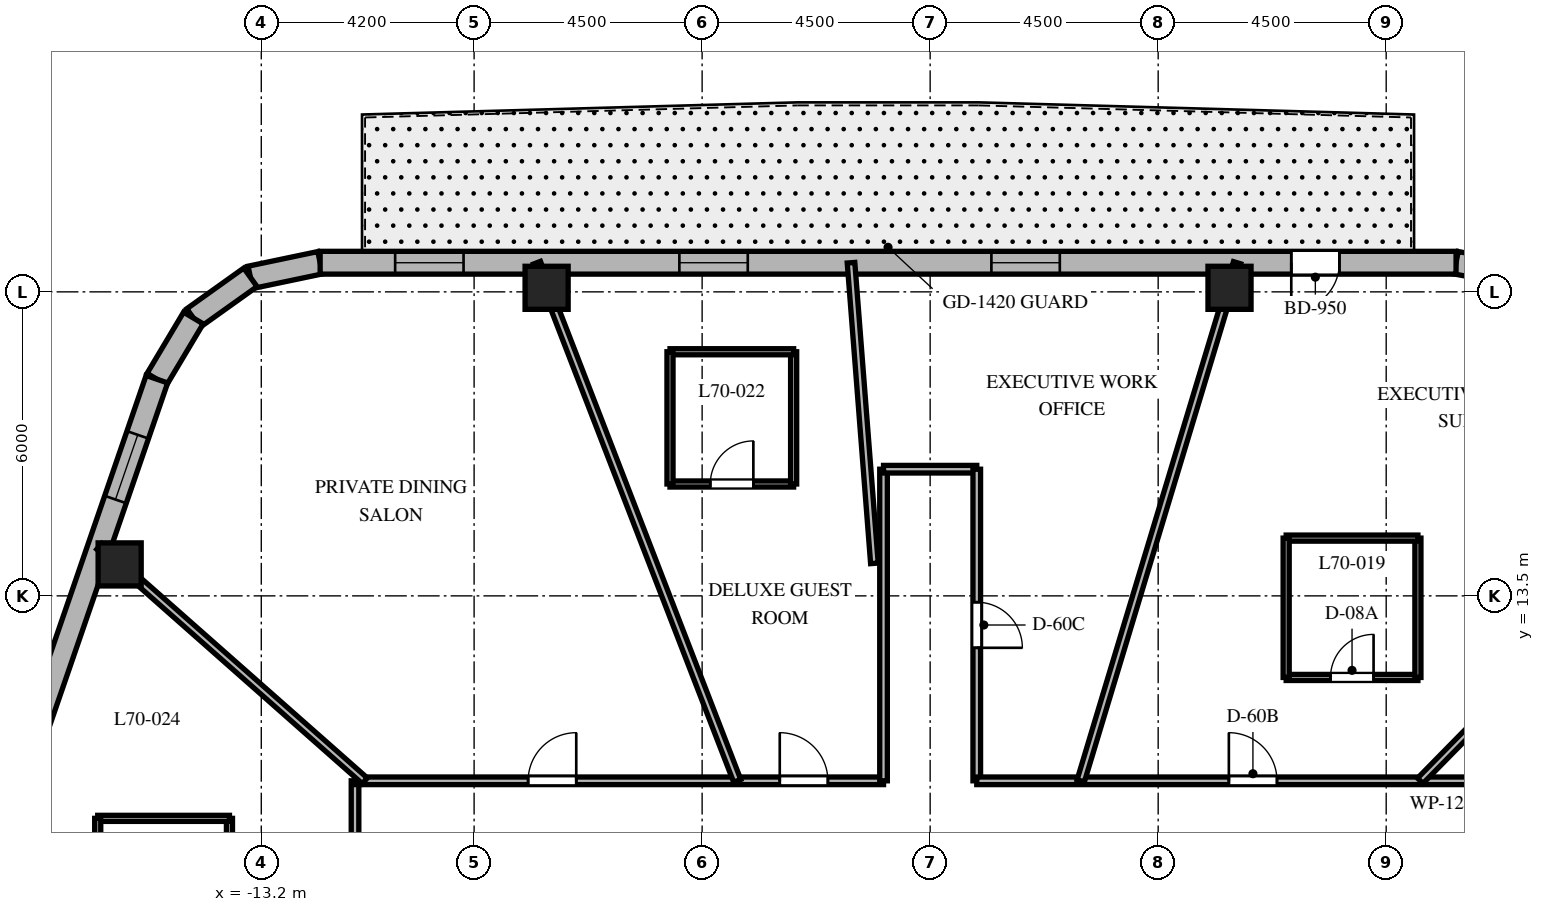
"""IFC4 building model, lengths in metres.
Left out: names, types, materials, properties, quantities, classifications, styles, units other than length and angle.
Written with IfcOpenShell. Run it as: python <this file> out.ifc"""

import sys

from ifc_helpers import new_model, si_unit, direction, frame, frame_2d, origin, origin_2d, place, context, subcontext, project, spatial, rectangle, extrude, element, fill, save


model = new_model("IFC4")
c1 = context("Model", 3, precision=1e-05, world=origin(), true_north=direction((0.0, 1.0)))
c2 = subcontext(c1, "Body", "Model", "MODEL_VIEW")
j1 = project(units=[si_unit("LENGTHUNIT", "METRE"), si_unit("PLANEANGLEUNIT", "RADIAN")], contexts=[c1])
p1 = place(None, origin())
s1 = spatial("IfcSite", under=j1, at=p1, CompositionType="ELEMENT")
p2 = place(p1, origin())
s2 = spatial("IfcBuilding", under=s1, at=p2, CompositionType="ELEMENT")
p3 = place(p2, frame((0.0, 0.0, 280.8)))
s3 = spatial("IfcBuildingStorey", under=s2, at=p3, CompositionType="ELEMENT", Elevation=280.8)
for number, where, z_axis, x_axis in (
    (1, (5.908, 19.58, 0.0), (0.0, 0.0, 1.0), (1.0, 0.0, 0.0)),
    (2, (-7.569, 19.58, 0.0), (0.0, 0.0, 1.0), (1.0, 0.0, 0.0)),
    (3, (-15.995, 14.121, 0.0), (0.0, 0.0, 1.0), (1.0, 0.0, 0.0)),
):
    element("IfcColumn", number, at=place(p3, frame(where, z_axis=z_axis, x_axis=x_axis)), inside=s3, PredefinedType="COLUMN", context=c2, shape_type="SweptSolid", body=[
        extrude(rectangle(XDim=0.85, YDim=0.85, at=origin_2d()), origin(), (0.0, 0.0, 1.0), 3.9),
    ])
p4 = place(p3, frame((11.626, 19.84, 0.0), z_axis=(0.0, 0.0, 1.0), x_axis=(-0.982701956681, 0.185194126083, 0.0)))
e4 = element("IfcWall", 4, at=p4, inside=s3, PredefinedType="SOLIDWALL", context=c2, shape_type="SweptSolid", body=[
    extrude(rectangle(XDim=1.27, YDim=0.45, at=frame_2d((0.635, 0.0))), origin(), (0.0, 0.0, 1.0), 3.6),
])
p5 = place(p3, frame((-12.038, 20.075, 0.0), z_axis=(0.0, 0.0, 1.0), x_axis=(-0.978750122553, -0.205056571711, 0.0)))
e5 = element("IfcWall", 5, at=p5, inside=s3, PredefinedType="SOLIDWALL", context=c2, shape_type="SweptSolid", body=[
    extrude(rectangle(XDim=1.406, YDim=0.45, at=frame_2d((0.703, 0.0))), origin(), (0.0, 0.0, 1.0), 3.6),
])
p6 = place(p3, frame((-13.415, 19.787, 0.0), z_axis=(0.0, 0.0, 1.0), x_axis=(-0.814055493997, -0.580787097561, 0.0)))
e6 = element("IfcWall", 6, at=p6, inside=s3, PredefinedType="SOLIDWALL", context=c2, shape_type="SweptSolid", body=[
    extrude(rectangle(XDim=1.383, YDim=0.45, at=frame_2d((0.691, 0.0))), origin(), (0.0, 0.0, 1.0), 3.6),
])
p7 = place(p3, frame((-14.54, 18.984, 0.0), z_axis=(0.0, 0.0, 1.0), x_axis=(-0.512374906623, -0.858761873317, 0.0)))
e7 = element("IfcWall", 7, at=p7, inside=s3, PredefinedType="SOLIDWALL", context=c2, shape_type="SweptSolid", body=[
    extrude(rectangle(XDim=1.406, YDim=0.45, at=frame_2d((0.703, 0.0))), origin(), (0.0, 0.0, 1.0), 3.6),
])
p8 = place(p3, frame((10.379, 20.075, 0.0), z_axis=(0.0, 0.0, 1.0), x_axis=(-1.0, 0.0, 0.0)))
e8 = element("IfcWall", 8, at=p8, inside=s3, PredefinedType="SOLIDWALL", context=c2, shape_type="SweptSolid", body=[
    extrude(rectangle(XDim=22.417, YDim=0.45, at=frame_2d((11.208, 0.0))), origin(), (0.0, 0.0, 1.0), 3.6),
])
p9 = place(p8, frame((2.302, 0.0, 0.0)))
e9 = element("IfcOpeningElement", 9, at=p9, cuts=e8, PredefinedType="OPENING", context=c2, shape_type="SweptSolid", body=[
    extrude(rectangle(XDim=0.95, YDim=2.15, at=frame_2d((0.475, 1.075))), frame((0.0, 0.235, 0.0), z_axis=(0.0, -1.0, 0.0), x_axis=(1.0, 0.0, 0.0)), (0.0, 0.0, 1.0), 0.47),
])
p10 = place(p8, frame((7.82, 0.0, 0.8)))
e10 = element("IfcOpeningElement", 10, at=p10, cuts=e8, PredefinedType="OPENING", context=c2, shape_type="SweptSolid", body=[
    extrude(rectangle(XDim=1.35, YDim=1.75, at=frame_2d((0.675, 0.875))), frame((0.0, 0.235, 0.0), z_axis=(0.0, -1.0, 0.0), x_axis=(1.0, 0.0, 0.0)), (0.0, 0.0, 1.0), 0.47),
])
p11 = place(p8, frame((13.978, 0.0, 0.8)))
e11 = element("IfcOpeningElement", 11, at=p11, cuts=e8, PredefinedType="OPENING", context=c2, shape_type="SweptSolid", body=[
    extrude(rectangle(XDim=1.35, YDim=1.75, at=frame_2d((0.675, 0.875))), frame((0.0, 0.235, 0.0), z_axis=(0.0, -1.0, 0.0), x_axis=(1.0, 0.0, 0.0)), (0.0, 0.0, 1.0), 0.47),
])
p12 = place(p8, frame((19.587, 0.0, 0.8)))
e12 = element("IfcOpeningElement", 12, at=p12, cuts=e8, PredefinedType="OPENING", context=c2, shape_type="SweptSolid", body=[
    extrude(rectangle(XDim=1.35, YDim=1.75, at=frame_2d((0.675, 0.875))), frame((0.0, 0.235, 0.0), z_axis=(0.0, -1.0, 0.0), x_axis=(1.0, 0.0, 0.0)), (0.0, 0.0, 1.0), 0.47),
])
p13 = place(p3, frame((-15.26, 17.776, 0.0), z_axis=(0.0, 0.0, 1.0), x_axis=(-0.325407437101, -0.945573899745, 0.0)))
e13 = element("IfcWall", 13, at=p13, inside=s3, PredefinedType="SOLIDWALL", context=c2, shape_type="SweptSolid", body=[
    extrude(rectangle(XDim=18.552, YDim=0.45, at=frame_2d((9.276, 0.0))), origin(), (0.0, 0.0, 1.0), 3.6),
])
p14 = place(p13, frame((1.161, 0.0, 0.8)))
e14 = element("IfcOpeningElement", 14, at=p14, cuts=e13, PredefinedType="OPENING", context=c2, shape_type="SweptSolid", body=[
    extrude(rectangle(XDim=1.35, YDim=1.75, at=frame_2d((0.675, 0.875))), frame((0.0, 0.235, 0.0), z_axis=(0.0, -1.0, 0.0), x_axis=(1.0, 0.0, 0.0)), (0.0, 0.0, 1.0), 0.47),
])
p15 = place(p13, frame((8.548, 0.0, 0.8)))
e15 = element("IfcOpeningElement", 15, at=p15, cuts=e13, PredefinedType="OPENING", context=c2, shape_type="SweptSolid", body=[
    extrude(rectangle(XDim=1.35, YDim=1.75, at=frame_2d((0.675, 0.875))), frame((0.0, 0.235, 0.0), z_axis=(0.0, -1.0, 0.0), x_axis=(1.0, 0.0, 0.0)), (0.0, 0.0, 1.0), 0.47),
])
p16 = place(p13, frame((15.987, 0.0, 0.8)))
e16 = element("IfcOpeningElement", 16, at=p16, cuts=e13, PredefinedType="OPENING", context=c2, shape_type="SweptSolid", body=[
    extrude(rectangle(XDim=1.35, YDim=1.75, at=frame_2d((0.675, 0.875))), frame((0.0, 0.235, 0.0), z_axis=(0.0, -1.0, 0.0), x_axis=(1.0, 0.0, 0.0)), (0.0, 0.0, 1.0), 0.47),
])
p17 = place(p3, frame((-11.35, 4.4, 0.0), z_axis=(0.0, 0.0, 1.0), x_axis=(0.0, 1.0, 0.0)))
e17 = element("IfcWall", 17, at=p17, inside=s3, PredefinedType="PARTITIONING", context=c2, shape_type="SweptSolid", body=[
    extrude(rectangle(XDim=5.45, YDim=0.15, at=frame_2d((2.725, 0.0))), origin(), (0.0, 0.0, 1.0), 3.09),
])
p18 = place(p3, frame((-11.35, 9.85, 0.0), z_axis=(0.0, 0.0, 1.0), x_axis=(1.0, 0.0, 0.0)))
e18 = element("IfcWall", 18, at=p18, inside=s3, PredefinedType="PARTITIONING", context=c2, shape_type="SweptSolid", body=[
    extrude(rectangle(XDim=10.43, YDim=0.15, at=frame_2d((5.215, 0.0))), origin(), (0.0, 0.0, 1.0), 3.09),
])
p19 = place(p18, frame((8.382, 0.0, 0.0)))
e19 = element("IfcOpeningElement", 19, at=p19, cuts=e18, PredefinedType="OPENING", context=c2, shape_type="SweptSolid", body=[
    extrude(rectangle(XDim=0.95, YDim=2.03, at=frame_2d((0.475, 1.015))), frame((0.0, 0.085, 0.0), z_axis=(0.0, -1.0, 0.0), x_axis=(1.0, 0.0, 0.0)), (0.0, 0.0, 1.0), 0.17),
])
p20 = place(p18, frame((3.416, 0.0, 0.0)))
e20 = element("IfcOpeningElement", 20, at=p20, cuts=e18, PredefinedType="OPENING", context=c2, shape_type="SweptSolid", body=[
    extrude(rectangle(XDim=0.95, YDim=2.03, at=frame_2d((0.475, 1.015))), frame((0.0, 0.085, 0.0), z_axis=(0.0, -1.0, 0.0), x_axis=(1.0, 0.0, 0.0)), (0.0, 0.0, 1.0), 0.17),
])
p21 = place(p3, frame((-0.92, 9.85, 0.0), z_axis=(0.0, 0.0, 1.0), x_axis=(0.0, 1.0, 0.0)))
e21 = element("IfcWall", 21, at=p21, inside=s3, PredefinedType="PARTITIONING", context=c2, shape_type="SweptSolid", body=[
    extrude(rectangle(XDim=6.15, YDim=0.15, at=frame_2d((3.075, 0.0))), origin(), (0.0, 0.0, 1.0), 3.041),
])
p22 = place(p3, frame((-0.92, 16.0, 0.0), z_axis=(0.0, 0.0, 1.0), x_axis=(1.0, 0.0, 0.0)))
e22 = element("IfcWall", 22, at=p22, inside=s3, PredefinedType="PARTITIONING", context=c2, shape_type="SweptSolid", body=[
    extrude(rectangle(XDim=1.84, YDim=0.15, at=frame_2d((0.92, 0.0))), origin(), (0.0, 0.0, 1.0), 3.6),
])
p23 = place(p3, frame((0.92, 16.0, 0.0), z_axis=(0.0, 0.0, 1.0), x_axis=(0.0, -1.0, 0.0)))
e23 = element("IfcWall", 23, at=p23, inside=s3, PredefinedType="PARTITIONING", context=c2, shape_type="SweptSolid", body=[
    extrude(rectangle(XDim=6.15, YDim=0.15, at=frame_2d((3.075, 0.0))), origin(), (0.0, 0.0, 1.0), 3.041),
])
p24 = place(p23, frame((2.625, 0.0, 0.0)))
e24 = element("IfcOpeningElement", 24, at=p24, cuts=e23, PredefinedType="OPENING", context=c2, shape_type="SweptSolid", body=[
    extrude(rectangle(XDim=0.9, YDim=2.03, at=frame_2d((0.45, 1.015))), frame((0.0, 0.085, 0.0), z_axis=(0.0, -1.0, 0.0), x_axis=(1.0, 0.0, 0.0)), (0.0, 0.0, 1.0), 0.17),
])
p25 = place(p3, frame((0.92, 9.85, 0.0), z_axis=(0.0, 0.0, 1.0), x_axis=(1.0, 0.0, 0.0)))
e25 = element("IfcWall", 25, at=p25, inside=s3, PredefinedType="PARTITIONING", context=c2, shape_type="SweptSolid", body=[
    extrude(rectangle(XDim=10.43, YDim=0.15, at=frame_2d((5.215, 0.0))), origin(), (0.0, 0.0, 1.0), 3.09),
])
p26 = place(p25, frame((4.975, 0.0, 0.0)))
e26 = element("IfcOpeningElement", 26, at=p26, cuts=e25, PredefinedType="OPENING", context=c2, shape_type="SweptSolid", body=[
    extrude(rectangle(XDim=0.95, YDim=2.03, at=frame_2d((0.475, 1.015))), frame((0.0, 0.085, 0.0), z_axis=(0.0, -1.0, 0.0), x_axis=(1.0, 0.0, 0.0)), (0.0, 0.0, 1.0), 0.17),
])
p27 = place(p3, frame((9.672, 9.85, 0.0), z_axis=(0.0, 0.0, 1.0), x_axis=(0.700629771301, 0.713524998558, 0.0)))
e27 = element("IfcWall", 27, at=p27, inside=s3, PredefinedType="PARTITIONING", context=c2, shape_type="SweptSolid", body=[
    extrude(rectangle(XDim=7.459, YDim=0.15, at=frame_2d((3.73, 0.0))), origin(), (0.0, 0.0, 1.0), 2.94),
])
p28 = place(p3, frame((2.972, 9.85, 0.0), z_axis=(0.0, 0.0, 1.0), x_axis=(0.288872169679, 0.957367677324, 0.0)))
e28 = element("IfcWall", 28, at=p28, inside=s3, PredefinedType="PARTITIONING", context=c2, shape_type="SweptSolid", body=[
    extrude(rectangle(XDim=10.68, YDim=0.15, at=frame_2d((5.34, 0.0))), origin(), (0.0, 0.0, 1.0), 2.94),
])
p29 = place(p3, frame((-1.1, 14.142, 0.0), z_axis=(0.0, 0.0, 1.0), x_axis=(-0.077534071454, 0.996989702938, 0.0)))
e29 = element("IfcWall", 29, at=p29, inside=s3, PredefinedType="PARTITIONING", context=c2, shape_type="SweptSolid", body=[
    extrude(rectangle(XDim=5.951, YDim=0.15, at=frame_2d((2.976, 0.0))), origin(), (0.0, 0.0, 1.0), 2.94),
])
p30 = place(p3, frame((-3.808, 9.85, 0.0), z_axis=(0.0, 0.0, 1.0), x_axis=(-0.360587327934, 0.932725457427, 0.0)))
e30 = element("IfcWall", 30, at=p30, inside=s3, PredefinedType="PARTITIONING", context=c2, shape_type="SweptSolid", body=[
    extrude(rectangle(XDim=10.962, YDim=0.15, at=frame_2d((5.481, 0.0))), origin(), (0.0, 0.0, 1.0), 2.94),
])
p31 = place(p3, frame((-11.157, 9.85, 0.0), z_axis=(0.0, 0.0, 1.0), x_axis=(-0.74966962095, 0.661812253909, 0.0)))
e31 = element("IfcWall", 31, at=p31, inside=s3, PredefinedType="PARTITIONING", context=c2, shape_type="SweptSolid", body=[
    extrude(rectangle(XDim=6.989, YDim=0.15, at=frame_2d((3.494, 0.0))), origin(), (0.0, 0.0, 1.0), 2.94),
])
p32 = place(p3, frame((7.026, 11.89, 0.0), z_axis=(0.0, 0.0, 1.0), x_axis=(1.0, 0.0, 0.0)))
e32 = element("IfcWall", 32, at=p32, inside=s3, PredefinedType="PARTITIONING", context=c2, shape_type="SweptSolid", body=[
    extrude(rectangle(XDim=2.6, YDim=0.12, at=frame_2d((1.3, 0.0))), origin(), (0.0, 0.0, 1.0), 3.041),
])
p33 = place(p32, frame((0.875, 0.0, 0.0)))
e33 = element("IfcOpeningElement", 33, at=p33, cuts=e32, PredefinedType="OPENING", context=c2, shape_type="SweptSolid", body=[
    extrude(rectangle(XDim=0.85, YDim=2.03, at=frame_2d((0.425, 1.015))), frame((0.0, 0.07, 0.0), z_axis=(0.0, -1.0, 0.0), x_axis=(1.0, 0.0, 0.0)), (0.0, 0.0, 1.0), 0.14),
])
p34 = place(p3, frame((9.626, 11.89, 0.0), z_axis=(0.0, 0.0, 1.0), x_axis=(0.0, 1.0, 0.0)))
e34 = element("IfcWall", 34, at=p34, inside=s3, PredefinedType="PARTITIONING", context=c2, shape_type="SweptSolid", body=[
    extrude(rectangle(XDim=2.75, YDim=0.12, at=frame_2d((1.375, 0.0))), origin(), (0.0, 0.0, 1.0), 3.172),
])
p35 = place(p3, frame((9.626, 14.64, 0.0), z_axis=(0.0, 0.0, 1.0), x_axis=(-1.0, 0.0, 0.0)))
e35 = element("IfcWall", 35, at=p35, inside=s3, PredefinedType="PARTITIONING", context=c2, shape_type="SweptSolid", body=[
    extrude(rectangle(XDim=2.6, YDim=0.12, at=frame_2d((1.3, 0.0))), origin(), (0.0, 0.0, 1.0), 3.172),
])
p36 = place(p3, frame((7.026, 14.64, 0.0), z_axis=(0.0, 0.0, 1.0), x_axis=(0.0, -1.0, 0.0)))
e36 = element("IfcWall", 36, at=p36, inside=s3, PredefinedType="PARTITIONING", context=c2, shape_type="SweptSolid", body=[
    extrude(rectangle(XDim=2.75, YDim=0.12, at=frame_2d((1.375, 0.0))), origin(), (0.0, 0.0, 1.0), 3.041),
])
p37 = place(p3, frame((-5.134, 15.708, 0.0), z_axis=(0.0, 0.0, 1.0), x_axis=(1.0, 0.0, 0.0)))
e37 = element("IfcWall", 37, at=p37, inside=s3, PredefinedType="PARTITIONING", context=c2, shape_type="SweptSolid", body=[
    extrude(rectangle(XDim=2.44, YDim=0.12, at=frame_2d((1.22, 0.0))), origin(), (0.0, 0.0, 1.0), 3.041),
])
p38 = place(p37, frame((0.795, 0.0, 0.0)))
e38 = element("IfcOpeningElement", 38, at=p38, cuts=e37, PredefinedType="OPENING", context=c2, shape_type="SweptSolid", body=[
    extrude(rectangle(XDim=0.85, YDim=2.03, at=frame_2d((0.425, 1.015))), frame((0.0, 0.07, 0.0), z_axis=(0.0, -1.0, 0.0), x_axis=(1.0, 0.0, 0.0)), (0.0, 0.0, 1.0), 0.14),
])
p39 = place(p3, frame((-2.694, 15.708, 0.0), z_axis=(0.0, 0.0, 1.0), x_axis=(0.0, 1.0, 0.0)))
e39 = element("IfcWall", 39, at=p39, inside=s3, PredefinedType="PARTITIONING", context=c2, shape_type="SweptSolid", body=[
    extrude(rectangle(XDim=2.61, YDim=0.12, at=frame_2d((1.305, 0.0))), origin(), (0.0, 0.0, 1.0), 3.041),
])
p40 = place(p3, frame((-2.694, 18.318, 0.0), z_axis=(0.0, 0.0, 1.0), x_axis=(-1.0, 0.0, 0.0)))
e40 = element("IfcWall", 40, at=p40, inside=s3, PredefinedType="PARTITIONING", context=c2, shape_type="SweptSolid", body=[
    extrude(rectangle(XDim=2.44, YDim=0.12, at=frame_2d((1.22, 0.0))), origin(), (0.0, 0.0, 1.0), 3.6),
])
p41 = place(p3, frame((-5.134, 18.318, 0.0), z_axis=(0.0, 0.0, 1.0), x_axis=(0.0, -1.0, 0.0)))
e41 = element("IfcWall", 41, at=p41, inside=s3, PredefinedType="PARTITIONING", context=c2, shape_type="SweptSolid", body=[
    extrude(rectangle(XDim=2.61, YDim=0.12, at=frame_2d((1.305, 0.0))), origin(), (0.0, 0.0, 1.0), 3.041),
])
p42 = place(p3, frame((-13.828, 6.359, 0.0), z_axis=(0.0, 0.0, 1.0), x_axis=(0.0, 1.0, 0.0)))
e42 = element("IfcWall", 42, at=p42, inside=s3, PredefinedType="PARTITIONING", context=c2, shape_type="SweptSolid", body=[
    extrude(rectangle(XDim=2.75, YDim=0.12, at=frame_2d((1.375, 0.0))), origin(), (0.0, 0.0, 1.0), 3.6),
])
p43 = place(p3, frame((-13.828, 9.109, 0.0), z_axis=(0.0, 0.0, 1.0), x_axis=(-1.0, 0.0, 0.0)))
e43 = element("IfcWall", 43, at=p43, inside=s3, PredefinedType="PARTITIONING", context=c2, shape_type="SweptSolid", body=[
    extrude(rectangle(XDim=2.6, YDim=0.12, at=frame_2d((1.3, 0.0))), origin(), (0.0, 0.0, 1.0), 3.172),
])
p44 = place(p3, frame((-16.428, 9.109, 0.0), z_axis=(0.0, 0.0, 1.0), x_axis=(0.0, -1.0, 0.0)))
e44 = element("IfcWall", 44, at=p44, inside=s3, PredefinedType="PARTITIONING", context=c2, shape_type="SweptSolid", body=[
    extrude(rectangle(XDim=2.75, YDim=0.12, at=frame_2d((1.375, 0.0))), origin(), (0.0, 0.0, 1.0), 3.6),
])
p45 = place(p9, origin())
e45 = element("IfcDoor", 45, at=p45, inside=s3, OperationType="SINGLE_SWING_RIGHT", PredefinedType="DOOR", context=c2, shape_type="SweptSolid", body=[
    extrude(rectangle(XDim=0.95, YDim=2.15, at=frame_2d((0.475, 1.075))), frame((0.0, 0.025, 0.0), z_axis=(0.0, -1.0, 0.0), x_axis=(1.0, 0.0, 0.0)), (0.0, 0.0, 1.0), 0.05),
])
fill(e9, e45)
p46 = place(p10, origin())
e46 = element("IfcWindow", 46, at=p46, inside=s3, PartitioningType="SINGLE_PANEL", PredefinedType="WINDOW", context=c2, shape_type="SweptSolid", body=[
    extrude(rectangle(XDim=1.35, YDim=1.75, at=frame_2d((0.675, 0.875))), frame((0.0, 0.03, 0.0), z_axis=(0.0, -1.0, 0.0), x_axis=(1.0, 0.0, 0.0)), (0.0, 0.0, 1.0), 0.06),
])
fill(e10, e46)
p47 = place(p11, origin())
e47 = element("IfcWindow", 47, at=p47, inside=s3, PartitioningType="SINGLE_PANEL", PredefinedType="WINDOW", context=c2, shape_type="SweptSolid", body=[
    extrude(rectangle(XDim=1.35, YDim=1.75, at=frame_2d((0.675, 0.875))), frame((0.0, 0.03, 0.0), z_axis=(0.0, -1.0, 0.0), x_axis=(1.0, 0.0, 0.0)), (0.0, 0.0, 1.0), 0.06),
])
fill(e11, e47)
p48 = place(p12, origin())
e48 = element("IfcWindow", 48, at=p48, inside=s3, PartitioningType="SINGLE_PANEL", PredefinedType="WINDOW", context=c2, shape_type="SweptSolid", body=[
    extrude(rectangle(XDim=1.35, YDim=1.75, at=frame_2d((0.675, 0.875))), frame((0.0, 0.03, 0.0), z_axis=(0.0, -1.0, 0.0), x_axis=(1.0, 0.0, 0.0)), (0.0, 0.0, 1.0), 0.06),
])
fill(e12, e48)
p49 = place(p14, origin())
e49 = element("IfcWindow", 49, at=p49, inside=s3, PartitioningType="SINGLE_PANEL", PredefinedType="WINDOW", context=c2, shape_type="SweptSolid", body=[
    extrude(rectangle(XDim=1.35, YDim=1.75, at=frame_2d((0.675, 0.875))), frame((0.0, 0.03, 0.0), z_axis=(0.0, -1.0, 0.0), x_axis=(1.0, 0.0, 0.0)), (0.0, 0.0, 1.0), 0.06),
])
fill(e14, e49)
p50 = place(p26, origin())
e50 = element("IfcDoor", 50, at=p50, inside=s3, OperationType="SINGLE_SWING_LEFT", PredefinedType="DOOR", context=c2, shape_type="SweptSolid", body=[
    extrude(rectangle(XDim=0.95, YDim=2.03, at=frame_2d((0.475, 1.015))), frame((0.0, 0.025, 0.0), z_axis=(0.0, -1.0, 0.0), x_axis=(1.0, 0.0, 0.0)), (0.0, 0.0, 1.0), 0.05),
])
fill(e26, e50)
p51 = place(p33, origin())
e51 = element("IfcDoor", 51, at=p51, inside=s3, OperationType="SINGLE_SWING_RIGHT", PredefinedType="DOOR", context=c2, shape_type="SweptSolid", body=[
    extrude(rectangle(XDim=0.85, YDim=2.03, at=frame_2d((0.425, 1.015))), frame((0.0, 0.025, 0.0), z_axis=(0.0, -1.0, 0.0), x_axis=(1.0, 0.0, 0.0)), (0.0, 0.0, 1.0), 0.05),
])
fill(e33, e51)
p52 = place(p24, origin())
e52 = element("IfcDoor", 52, at=p52, inside=s3, OperationType="SINGLE_SWING_RIGHT", PredefinedType="DOOR", context=c2, shape_type="SweptSolid", body=[
    extrude(rectangle(XDim=0.9, YDim=2.03, at=frame_2d((0.45, 1.015))), frame((0.0, 0.025, 0.0), z_axis=(0.0, -1.0, 0.0), x_axis=(1.0, 0.0, 0.0)), (0.0, 0.0, 1.0), 0.05),
])
fill(e24, e52)
p53 = place(p19, origin())
e53 = element("IfcDoor", 53, at=p53, inside=s3, OperationType="SINGLE_SWING_LEFT", PredefinedType="DOOR", context=c2, shape_type="SweptSolid", body=[
    extrude(rectangle(XDim=0.95, YDim=2.03, at=frame_2d((0.475, 1.015))), frame((0.0, 0.025, 0.0), z_axis=(0.0, -1.0, 0.0), x_axis=(1.0, 0.0, 0.0)), (0.0, 0.0, 1.0), 0.05),
])
fill(e19, e53)
p54 = place(p38, origin())
e54 = element("IfcDoor", 54, at=p54, inside=s3, OperationType="SINGLE_SWING_RIGHT", PredefinedType="DOOR", context=c2, shape_type="SweptSolid", body=[
    extrude(rectangle(XDim=0.85, YDim=2.03, at=frame_2d((0.425, 1.015))), frame((0.0, 0.025, 0.0), z_axis=(0.0, -1.0, 0.0), x_axis=(1.0, 0.0, 0.0)), (0.0, 0.0, 1.0), 0.05),
])
fill(e38, e54)
p55 = place(p20, origin())
e55 = element("IfcDoor", 55, at=p55, inside=s3, OperationType="SINGLE_SWING_RIGHT", PredefinedType="DOOR", context=c2, shape_type="SweptSolid", body=[
    extrude(rectangle(XDim=0.95, YDim=2.03, at=frame_2d((0.475, 1.015))), frame((0.0, 0.025, 0.0), z_axis=(0.0, -1.0, 0.0), x_axis=(1.0, 0.0, 0.0)), (0.0, 0.0, 1.0), 0.05),
])
fill(e20, e55)
save(model, sys.argv[1])
